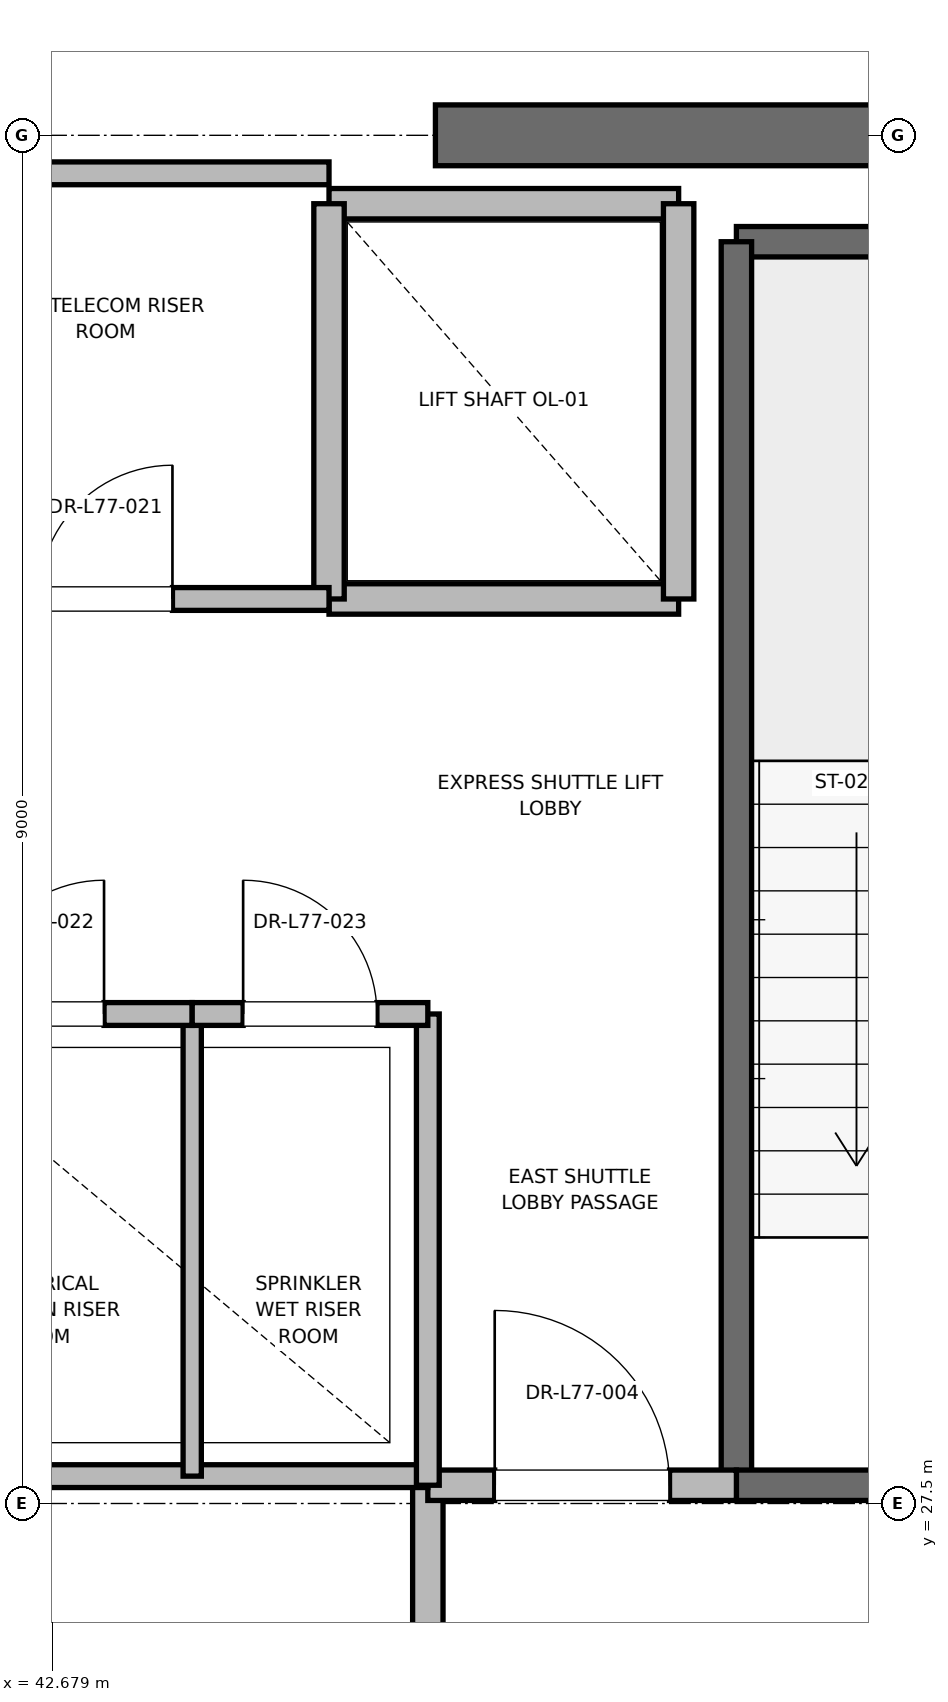
"""IFC4 building model, lengths in metres.
Left out: names, types, materials, properties, quantities, classifications, styles, units other than length and angle.
Written with IfcOpenShell. Run it as: python <this file> out.ifc"""

import sys

from ifc_helpers import new_model, si_unit, direction, frame, frame_2d, origin, place, context, subcontext, project, spatial, rectangle, extrude, element, fill, save


model = new_model("IFC4")
c1 = context("Model", 3, precision=1e-05, world=origin(), true_north=direction((0.0, 1.0)))
c2 = subcontext(c1, "Body", "Model", "MODEL_VIEW")
j1 = project(units=[si_unit("LENGTHUNIT", "METRE"), si_unit("PLANEANGLEUNIT", "RADIAN")], contexts=[c1])
p1 = place(None, origin())
s1 = spatial("IfcSite", under=j1, at=p1, CompositionType="ELEMENT")
p2 = place(p1, origin())
s2 = spatial("IfcBuilding", under=s1, at=p2, CompositionType="ELEMENT")
p3 = place(p2, frame((0.0, 0.0, 330.8)))
s3 = spatial("IfcBuildingStorey", under=s2, at=p3, CompositionType="ELEMENT", Elevation=330.8)
p4 = place(p3, frame((45.2, 36.5, 0.0), z_axis=(0.0, 0.0, 1.0), x_axis=(1.0, 0.0, 0.0)))
e1 = element("IfcWall", 1, at=p4, inside=s3, PredefinedType="SHEAR", context=c2, shape_type="SweptSolid", body=[
    extrude(rectangle(XDim=5.8, YDim=0.4, at=frame_2d((2.9, 0.0))), origin(), (0.0, 0.0, 1.0), 3.785),
])
p5 = place(p3, frame((47.18, 35.8, 0.0), z_axis=(0.0, 0.0, 1.0), x_axis=(1.0, 0.0, 0.0)))
e2 = element("IfcWall", 2, at=p5, inside=s3, PredefinedType="SOLIDWALL", context=c2, shape_type="SweptSolid", body=[
    extrude(rectangle(XDim=3.12, YDim=0.2, at=frame_2d((1.56, 0.0))), origin(), (0.0, 0.0, 1.0), 3.785),
])
p6 = place(p3, frame((47.18, 27.62, 0.0), z_axis=(0.0, 0.0, 1.0), x_axis=(0.0, 1.0, 0.0)))
e3 = element("IfcWall", 3, at=p6, inside=s3, PredefinedType="SOLIDWALL", context=c2, shape_type="SweptSolid", body=[
    extrude(rectangle(XDim=8.18, YDim=0.2, at=frame_2d((4.09, 0.0))), origin(), (0.0, 0.0, 1.0), 3.785),
])
p7 = place(p3, frame((47.18, 27.62, 0.0), z_axis=(0.0, 0.0, 1.0), x_axis=(1.0, 0.0, 0.0)))
e4 = element("IfcWall", 4, at=p7, inside=s3, PredefinedType="SOLIDWALL", context=c2, shape_type="SweptSolid", body=[
    extrude(rectangle(XDim=3.12, YDim=0.2, at=frame_2d((1.56, 0.0))), origin(), (0.0, 0.0, 1.0), 3.785),
])
p8 = place(p7, frame((1.01, 0.0, 0.0)))
e5 = element("IfcOpeningElement", 5, at=p8, cuts=e4, PredefinedType="OPENING", context=c2, shape_type="SweptSolid", body=[
    extrude(rectangle(XDim=1.1, YDim=2.15, at=frame_2d((0.55, 1.075))), frame((0.0, 0.1, 0.0), z_axis=(0.0, -1.0, 0.0), x_axis=(1.0, 0.0, 0.0)), (0.0, 0.0, 1.0), 0.2),
])
p9 = place(p3, frame((45.15, 24.25, 0.0), z_axis=(0.0, 0.0, 1.0), x_axis=(0.0, 1.0, 0.0)))
e6 = element("IfcWall", 6, at=p9, inside=s3, PredefinedType="PARTITIONING", context=c2, shape_type="SweptSolid", body=[
    extrude(rectangle(XDim=3.37, YDim=0.2, at=frame_2d((1.685, 0.0))), origin(), (0.0, 0.0, 1.0), 3.785),
])
p10 = place(p3, frame((45.15, 27.62, 0.0), z_axis=(0.0, 0.0, 1.0), x_axis=(1.0, 0.0, 0.0)))
e7 = element("IfcWall", 7, at=p10, inside=s3, PredefinedType="PARTITIONING", context=c2, shape_type="SweptSolid", body=[
    extrude(rectangle(XDim=2.03, YDim=0.2, at=frame_2d((1.015, 0.0))), origin(), (0.0, 0.0, 1.0), 3.785),
])
p11 = place(p10, frame((0.44, 0.0, 0.0)))
e8 = element("IfcOpeningElement", 8, at=p11, cuts=e7, PredefinedType="OPENING", context=c2, shape_type="SweptSolid", body=[
    extrude(rectangle(XDim=1.15, YDim=2.2, at=frame_2d((0.575, 1.1))), frame((0.0, 0.1, 0.0), z_axis=(0.0, -1.0, 0.0), x_axis=(1.0, 0.0, 0.0)), (0.0, 0.0, 1.0), 0.2),
])
p12 = place(p3, frame((44.5, 33.45, 0.0), z_axis=(0.0, 0.0, 1.0), x_axis=(1.0, 0.0, 0.0)))
e9 = element("IfcWall", 9, at=p12, inside=s3, PredefinedType="SOLIDWALL", context=c2, shape_type="SweptSolid", body=[
    extrude(rectangle(XDim=2.3, YDim=0.2, at=frame_2d((1.15, 0.0))), origin(), (0.0, 0.0, 1.0), 3.785),
])
p13 = place(p3, frame((46.8, 36.05, 0.0), z_axis=(0.0, 0.0, 1.0), x_axis=(-1.0, 0.0, 0.0)))
e10 = element("IfcWall", 10, at=p13, inside=s3, PredefinedType="SOLIDWALL", context=c2, shape_type="SweptSolid", body=[
    extrude(rectangle(XDim=2.3, YDim=0.2, at=frame_2d((1.15, 0.0))), origin(), (0.0, 0.0, 1.0), 2.865),
])
p14 = place(p3, frame((44.5, 36.05, 0.0), z_axis=(0.0, 0.0, 1.0), x_axis=(0.0, -1.0, 0.0)))
e11 = element("IfcWall", 11, at=p14, inside=s3, PredefinedType="SOLIDWALL", context=c2, shape_type="SweptSolid", body=[
    extrude(rectangle(XDim=2.6, YDim=0.2, at=frame_2d((1.3, 0.0))), origin(), (0.0, 0.0, 1.0), 2.865),
])
p15 = place(p3, frame((46.8, 33.45, 0.0), z_axis=(0.0, 0.0, 1.0), x_axis=(0.0, 1.0, 0.0)))
e12 = element("IfcWall", 12, at=p15, inside=s3, PredefinedType="SOLIDWALL", context=c2, shape_type="SweptSolid", body=[
    extrude(rectangle(XDim=2.6, YDim=0.2, at=frame_2d((1.3, 0.0))), origin(), (0.0, 0.0, 1.0), 3.785),
])
p16 = place(p3, frame((41.56, 27.68, 0.0), z_axis=(0.0, 0.0, 1.0), x_axis=(1.0, 0.0, 0.0)))
e13 = element("IfcWall", 13, at=p16, inside=s3, PredefinedType="PARTITIONING", context=c2, shape_type="SweptSolid", body=[
    extrude(rectangle(XDim=3.59, YDim=0.15, at=frame_2d((1.795, 0.0))), origin(), (0.0, 0.0, 1.0), 2.85),
])
p17 = place(p3, frame((45.15, 27.62, 0.0), z_axis=(0.0, 0.0, 1.0), x_axis=(0.0, 1.0, 0.0)))
e14 = element("IfcWall", 14, at=p17, inside=s3, PredefinedType="PARTITIONING", context=c2, shape_type="SweptSolid", body=[
    extrude(rectangle(XDim=3.1, YDim=0.15, at=frame_2d((1.55, 0.0))), origin(), (0.0, 0.0, 1.0), 2.85),
])
p18 = place(p3, frame((43.6, 27.68, 0.0), z_axis=(0.0, 0.0, 1.0), x_axis=(0.0, 1.0, 0.0)))
e15 = element("IfcWall", 15, at=p18, inside=s3, PredefinedType="PARTITIONING", context=c2, shape_type="SweptSolid", body=[
    extrude(rectangle(XDim=3.04, YDim=0.12, at=frame_2d((1.52, 0.0))), origin(), (0.0, 0.0, 1.0), 2.85),
])
p19 = place(p3, frame((41.56, 30.72, 0.0), z_axis=(0.0, 0.0, 1.0), x_axis=(1.0, 0.0, 0.0)))
e16 = element("IfcWall", 16, at=p19, inside=s3, PredefinedType="PARTITIONING", context=c2, shape_type="SweptSolid", body=[
    extrude(rectangle(XDim=2.04, YDim=0.15, at=frame_2d((1.02, 0.0))), origin(), (0.0, 0.0, 1.0), 2.85),
])
p20 = place(p19, frame((0.58, 0.0, 0.0)))
e17 = element("IfcOpeningElement", 17, at=p20, cuts=e16, PredefinedType="OPENING", context=c2, shape_type="SweptSolid", body=[
    extrude(rectangle(XDim=0.88, YDim=2.1, at=frame_2d((0.44, 1.05))), frame((0.0, 0.075, 0.0), z_axis=(0.0, -1.0, 0.0), x_axis=(1.0, 0.0, 0.0)), (0.0, 0.0, 1.0), 0.15),
])
p21 = place(p3, frame((43.6, 30.72, 0.0), z_axis=(0.0, 0.0, 1.0), x_axis=(1.0, 0.0, 0.0)))
e18 = element("IfcWall", 18, at=p21, inside=s3, PredefinedType="PARTITIONING", context=c2, shape_type="SweptSolid", body=[
    extrude(rectangle(XDim=1.55, YDim=0.15, at=frame_2d((0.775, 0.0))), origin(), (0.0, 0.0, 1.0), 2.85),
])
p22 = place(p21, frame((0.335, 0.0, 0.0)))
e19 = element("IfcOpeningElement", 19, at=p22, cuts=e18, PredefinedType="OPENING", context=c2, shape_type="SweptSolid", body=[
    extrude(rectangle(XDim=0.88, YDim=2.1, at=frame_2d((0.44, 1.05))), frame((0.0, 0.075, 0.0), z_axis=(0.0, -1.0, 0.0), x_axis=(1.0, 0.0, 0.0)), (0.0, 0.0, 1.0), 0.15),
])
p23 = place(p3, frame((41.56, 36.25, 0.0), z_axis=(0.0, 0.0, 1.0), x_axis=(1.0, 0.0, 0.0)))
e20 = element("IfcWall", 20, at=p23, inside=s3, PredefinedType="PARTITIONING", context=c2, shape_type="SweptSolid", body=[
    extrude(rectangle(XDim=2.94, YDim=0.15, at=frame_2d((1.47, 0.0))), origin(), (0.0, 0.0, 1.0), 2.85),
])
p24 = place(p3, frame((41.56, 33.45, 0.0), z_axis=(0.0, 0.0, 1.0), x_axis=(1.0, 0.0, 0.0)))
e21 = element("IfcWall", 21, at=p24, inside=s3, PredefinedType="PARTITIONING", context=c2, shape_type="SweptSolid", body=[
    extrude(rectangle(XDim=2.94, YDim=0.15, at=frame_2d((1.47, 0.0))), origin(), (0.0, 0.0, 1.0), 2.85),
])
p25 = place(p24, frame((1.03, 0.0, 0.0)))
e22 = element("IfcOpeningElement", 22, at=p25, cuts=e21, PredefinedType="OPENING", context=c2, shape_type="SweptSolid", body=[
    extrude(rectangle(XDim=0.88, YDim=2.1, at=frame_2d((0.44, 1.05))), frame((0.0, 0.075, 0.0), z_axis=(0.0, -1.0, 0.0), x_axis=(1.0, 0.0, 0.0)), (0.0, 0.0, 1.0), 0.15),
])
p26 = place(p11, origin())
e23 = element("IfcDoor", 23, at=p26, inside=s3, OperationType="SINGLE_SWING_LEFT", PredefinedType="DOOR", context=c2, shape_type="SweptSolid", body=[
    extrude(rectangle(XDim=1.15, YDim=2.2, at=frame_2d((0.575, 1.1))), frame((0.0, 0.025, 0.0), z_axis=(0.0, -1.0, 0.0), x_axis=(1.0, 0.0, 0.0)), (0.0, 0.0, 1.0), 0.05),
])
fill(e8, e23)
p27 = place(p20, origin())
e24 = element("IfcDoor", 24, at=p27, inside=s3, OperationType="SINGLE_SWING_RIGHT", PredefinedType="DOOR", context=c2, shape_type="SweptSolid", body=[
    extrude(rectangle(XDim=0.88, YDim=2.1, at=frame_2d((0.44, 1.05))), frame((0.0, 0.025, 0.0), z_axis=(0.0, -1.0, 0.0), x_axis=(1.0, 0.0, 0.0)), (0.0, 0.0, 1.0), 0.05),
])
fill(e17, e24)
p28 = place(p22, origin())
e25 = element("IfcDoor", 25, at=p28, inside=s3, OperationType="SINGLE_SWING_LEFT", PredefinedType="DOOR", context=c2, shape_type="SweptSolid", body=[
    extrude(rectangle(XDim=0.88, YDim=2.1, at=frame_2d((0.44, 1.05))), frame((0.0, 0.025, 0.0), z_axis=(0.0, -1.0, 0.0), x_axis=(1.0, 0.0, 0.0)), (0.0, 0.0, 1.0), 0.05),
])
fill(e19, e25)
p29 = place(p25, origin())
e26 = element("IfcDoor", 26, at=p29, inside=s3, OperationType="SINGLE_SWING_RIGHT", PredefinedType="DOOR", context=c2, shape_type="SweptSolid", body=[
    extrude(rectangle(XDim=0.88, YDim=2.1, at=frame_2d((0.44, 1.05))), frame((0.0, 0.025, 0.0), z_axis=(0.0, -1.0, 0.0), x_axis=(1.0, 0.0, 0.0)), (0.0, 0.0, 1.0), 0.05),
])
fill(e22, e26)
save(model, sys.argv[1])
